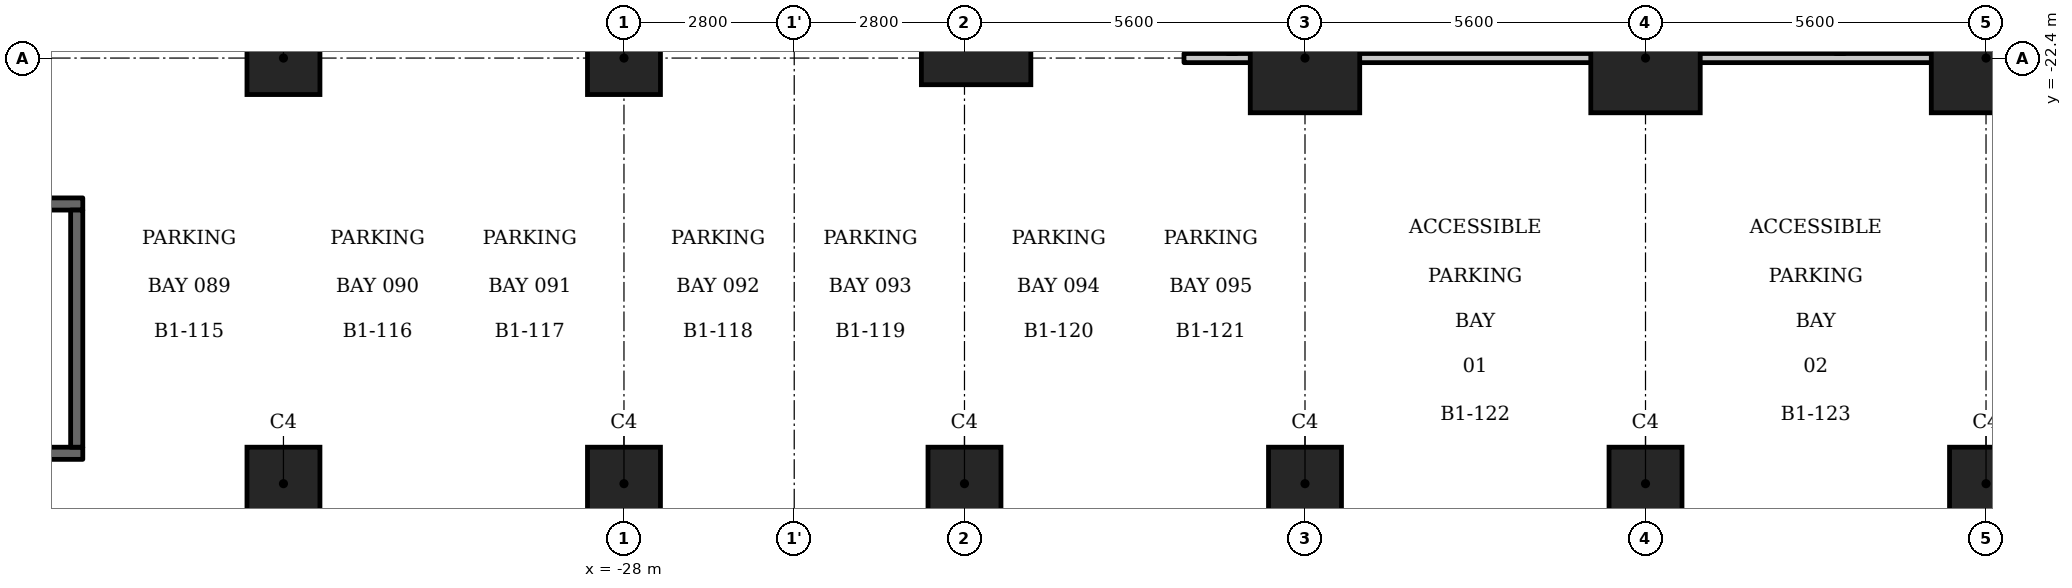
"""IFC4 building model, lengths in metres.
Left out: names, types, materials, properties, quantities, classifications, styles, units other than length and angle.
Written with IfcOpenShell. Run it as: python <this file> out.ifc"""

import sys

from ifc_helpers import new_model, si_unit, direction, frame, frame_2d, origin, origin_2d, place, context, subcontext, project, spatial, rectangle, circle, extrude, element, save


model = new_model("IFC4")
c1 = context("Model", 3, precision=1e-05, world=origin(), true_north=direction((0.0, 1.0)))
c2 = subcontext(c1, "Body", "Model", "MODEL_VIEW")
j1 = project(units=[si_unit("LENGTHUNIT", "METRE"), si_unit("PLANEANGLEUNIT", "RADIAN")], contexts=[c1])
p1 = place(None, origin())
s1 = spatial("IfcSite", under=j1, at=p1, CompositionType="ELEMENT")
p2 = place(p1, origin())
s2 = spatial("IfcBuilding", under=s1, at=p2, CompositionType="ELEMENT")
p3 = place(p2, frame((0.0, 0.0, -4.5)))
s3 = spatial("IfcBuildingStorey", under=s2, at=p3, CompositionType="ELEMENT", Elevation=-4.5)
for number, where, z_axis, x_axis in (
    (1, (-22.209, -21.938, 0.0), (0.0, 0.0, 1.0), (1.0, 0.0, 0.0)),
    (2, (-16.8, -22.4, 0.0), (0.0, 0.0, 1.0), (1.0, 0.0, 0.0)),
    (3, (-11.2, -22.4, 0.0), (0.0, 0.0, 1.0), (1.0, 0.0, 0.0)),
    (4, (-5.6, -22.4, 0.0), (0.0, 0.0, 1.0), (1.0, 0.0, 0.0)),
):
    element("IfcColumn", number, at=place(p3, frame(where, z_axis=z_axis, x_axis=x_axis)), inside=s3, PredefinedType="COLUMN", context=c2, shape_type="SweptSolid", body=[
        extrude(rectangle(XDim=1.8, YDim=1.8, at=origin_2d()), origin(), (0.0, 0.0, 1.0), 4.5),
    ])
for number, where, z_axis, x_axis in (
    (5, (-33.6, -29.4, 0.0), (0.0, 0.0, 1.0), (1.0, 0.0, 0.0)),
    (6, (-28.0, -29.4, 0.0), (0.0, 0.0, 1.0), (1.0, 0.0, 0.0)),
    (7, (-22.4, -29.4, 0.0), (0.0, 0.0, 1.0), (1.0, 0.0, 0.0)),
    (8, (-16.8, -29.4, 0.0), (0.0, 0.0, 1.0), (1.0, 0.0, 0.0)),
    (9, (-11.2, -29.4, 0.0), (0.0, 0.0, 1.0), (1.0, 0.0, 0.0)),
    (10, (-5.6, -29.4, 0.0), (0.0, 0.0, 1.0), (1.0, 0.0, 0.0)),
    (11, (-33.6, -22.4, 0.0), (0.0, 0.0, 1.0), (1.0, 0.0, 0.0)),
    (12, (-28.0, -22.4, 0.0), (0.0, 0.0, 1.0), (1.0, 0.0, 0.0)),
):
    element("IfcColumn", number, at=place(p3, frame(where, z_axis=z_axis, x_axis=x_axis)), inside=s3, PredefinedType="COLUMN", context=c2, shape_type="SweptSolid", body=[
        extrude(circle(Radius=0.6, at=origin_2d()), origin(), (0.0, 0.0, 1.0), 4.5),
    ])
p4 = place(p3, frame((-44.71, -28.9, 0.0), z_axis=(0.0, 0.0, 1.0), x_axis=(1.0, 0.0, 0.0)))
e13 = element("IfcWall", 13, at=p4, inside=s3, PredefinedType="SHEAR", context=c2, shape_type="SweptSolid", body=[
    extrude(rectangle(XDim=7.81, YDim=0.2, at=frame_2d((3.905, 0.0))), origin(), (0.0, 0.0, 1.0), 4.05),
])
p5 = place(p3, frame((-44.71, -24.8, 0.0), z_axis=(0.0, 0.0, 1.0), x_axis=(1.0, 0.0, 0.0)))
e14 = element("IfcWall", 14, at=p5, inside=s3, PredefinedType="SHEAR", context=c2, shape_type="SweptSolid", body=[
    extrude(rectangle(XDim=7.81, YDim=0.2, at=frame_2d((3.905, 0.0))), origin(), (0.0, 0.0, 1.0), 4.05),
])
p6 = place(p5, frame((0.65, 0.0, 0.0)))
e15 = element("IfcOpeningElement", 15, at=p6, cuts=e14, PredefinedType="OPENING", context=c2, shape_type="SweptSolid", body=[
    extrude(rectangle(XDim=1.2, YDim=2.1, at=frame_2d((0.6, 1.05))), frame((0.0, 0.11, 0.0), z_axis=(0.0, -1.0, 0.0), x_axis=(1.0, 0.0, 0.0)), (0.0, 0.0, 1.0), 0.22),
])
p7 = place(p3, frame((-18.79, -22.4, 0.0), z_axis=(0.0, 0.0, 1.0), x_axis=(1.0, 0.0, 0.0)))
e16 = element("IfcWall", 16, at=p7, inside=s3, PredefinedType="PARTITIONING", context=c2, shape_type="SweptSolid", body=[
    extrude(rectangle(XDim=28.79, YDim=0.15, at=frame_2d((14.395, 0.0))), origin(), (0.0, 0.0, 1.0), 3.15),
])
p8 = place(p7, frame((15.69, 0.0, 0.0)))
e17 = element("IfcOpeningElement", 17, at=p8, cuts=e16, PredefinedType="OPENING", context=c2, shape_type="SweptSolid", body=[
    extrude(rectangle(XDim=1.8, YDim=2.1, at=frame_2d((0.9, 1.05))), frame((0.0, 0.085, 0.0), z_axis=(0.0, -1.0, 0.0), x_axis=(1.0, 0.0, 0.0)), (0.0, 0.0, 1.0), 0.17),
])
p9 = place(p3, frame((-37.0, -28.8, 0.0), z_axis=(0.0, 0.0, 1.0), x_axis=(0.0, 1.0, 0.0)))
e18 = element("IfcWall", 18, at=p9, inside=s3, PredefinedType="SHEAR", context=c2, shape_type="SweptSolid", body=[
    extrude(rectangle(XDim=3.9, YDim=0.2, at=frame_2d((1.95, 0.0))), origin(), (0.0, 0.0, 1.0), 4.05),
])
for number, where, z_axis, x_axis in (
    (19, (-18.0, -22.325, 0.0), (0.0, 0.0, 1.0), (0.0, 1.0, 0.0)),
    (20, (-8.0, -22.325, 0.0), (0.0, 0.0, 1.0), (0.0, 1.0, 0.0)),
):
    element("IfcWall", number, at=place(p3, frame(where, z_axis=z_axis, x_axis=x_axis)), inside=s3, PredefinedType="PARTITIONING", context=c2, shape_type="SweptSolid", body=[
        extrude(rectangle(XDim=6.65, YDim=0.15, at=frame_2d((3.325, 0.0))), origin(), (0.0, 0.0, 1.0), 4.05),
    ])
save(model, sys.argv[1])
